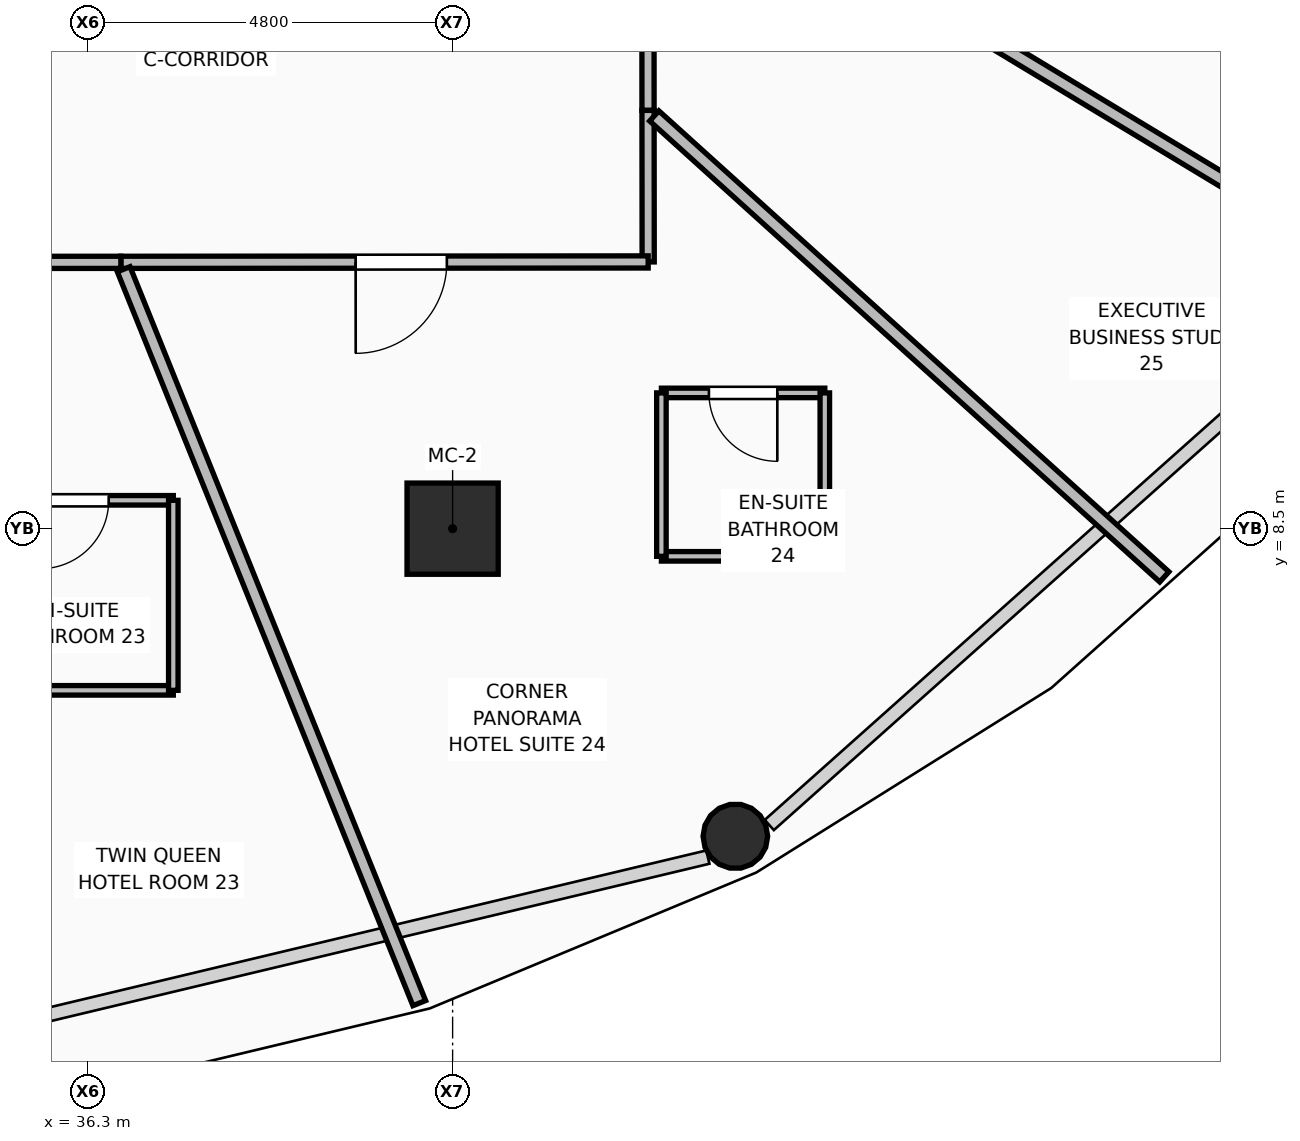
"""IFC4 building model, lengths in metres.
Left out: names, types, materials, properties, quantities, classifications, styles, units other than length and angle.
Written with IfcOpenShell. Run it as: python <this file> out.ifc"""

import sys

from ifc_helpers import new_model, si_unit, direction, frame, frame_2d, origin, origin_2d, place, context, subcontext, project, spatial, rectangle, hollow_rectangle, hollow_circle, extrude, element, fill, save


model = new_model("IFC4")
c1 = context("Model", 3, precision=1e-05, world=origin(), true_north=direction((0.0, 1.0)))
c2 = subcontext(c1, "Body", "Model", "MODEL_VIEW")
j1 = project(units=[si_unit("LENGTHUNIT", "METRE"), si_unit("PLANEANGLEUNIT", "RADIAN")], contexts=[c1])
p1 = place(None, origin())
s1 = spatial("IfcSite", under=j1, at=p1, CompositionType="ELEMENT")
p2 = place(p1, origin())
s2 = spatial("IfcBuilding", under=s1, at=p2, CompositionType="ELEMENT")
p3 = place(p2, frame((0.0, 0.0, 53.25)))
s3 = spatial("IfcBuildingStorey", under=s2, at=p3, CompositionType="ELEMENT", Elevation=53.25)
p4 = place(p3, frame((41.1, 8.5, 0.0), z_axis=(0.0, 0.0, 1.0), x_axis=(1.0, 0.0, 0.0)))
e1 = element("IfcColumn", 1, at=p4, inside=s3, PredefinedType="COLUMN", context=c2, shape_type="SweptSolid", body=[
    extrude(hollow_rectangle(XDim=1.2, YDim=1.2, WallThickness=0.045, at=origin_2d()), origin(), (0.0, 0.0, 1.0), 3.75),
])
p5 = place(p3, frame((44.82, 4.453, 0.0), z_axis=(0.111309599924, -0.172151708361, 0.978761442985), x_axis=(0.839754063035, 0.542966954443, 0.0)))
e2 = element("IfcColumn", 2, at=p5, inside=s3, PredefinedType="COLUMN", context=c2, shape_type="SweptSolid", body=[
    extrude(hollow_circle(Radius=0.425, WallThickness=0.04, at=origin_2d()), origin(), (0.0, 0.0, 1.0), 3.647),
])
p6 = place(p3, frame((43.669, 17.653, 0.0), z_axis=(0.0, 0.0, 1.0), x_axis=(0.000535081189, -0.999999856844, 0.0)))
e3 = element("IfcWall", 3, at=p6, inside=s3, PredefinedType="PARTITIONING", context=c2, shape_type="SweptSolid", body=[
    extrude(rectangle(XDim=3.65, YDim=0.16, at=frame_2d((1.825, 0.0))), origin(), (0.0, 0.0, 1.0), 2.928),
])
p7 = place(p6, frame((0.586, 0.0, 0.0)))
e4 = element("IfcOpeningElement", 4, at=p7, cuts=e3, PredefinedType="OPENING", context=c2, shape_type="SweptSolid", body=[
    extrude(rectangle(XDim=1.2, YDim=2.1, at=frame_2d((0.6, 1.05))), frame((0.0, 0.09, 0.0), z_axis=(0.0, -1.0, 0.0), x_axis=(1.0, 0.0, 0.0)), (0.0, 0.0, 1.0), 0.18),
])
p8 = place(p3, frame((43.671, 14.003, 0.0), z_axis=(0.0, 0.0, 1.0), x_axis=(0.001101995168, -0.999999392803, 0.0)))
e5 = element("IfcWall", 5, at=p8, inside=s3, PredefinedType="PARTITIONING", context=c2, shape_type="SweptSolid", body=[
    extrude(rectangle(XDim=1.994, YDim=0.16, at=frame_2d((0.997, 0.0))), origin(), (0.0, 0.0, 1.0), 3.55),
])
p9 = place(p3, frame((43.673, 12.009, 0.0), z_axis=(0.0, 0.0, 1.0), x_axis=(-0.999999726963, -0.000738968058, 0.0)))
e6 = element("IfcWall", 6, at=p9, inside=s3, PredefinedType="PARTITIONING", context=c2, shape_type="SweptSolid", body=[
    extrude(rectangle(XDim=6.938, YDim=0.16, at=frame_2d((3.469, 0.0))), origin(), (0.0, 0.0, 1.0), 2.928),
])
p10 = place(p9, frame((2.649, 0.0, 0.0)))
e7 = element("IfcOpeningElement", 7, at=p10, cuts=e6, PredefinedType="OPENING", context=c2, shape_type="SweptSolid", body=[
    extrude(rectangle(XDim=1.2, YDim=2.1, at=frame_2d((0.6, 1.05))), frame((0.0, 0.09, 0.0), z_axis=(0.0, -1.0, 0.0), x_axis=(1.0, 0.0, 0.0)), (0.0, 0.0, 1.0), 0.18),
])
p11 = place(p3, frame((36.735, 12.004, 0.0), z_axis=(0.0, 0.0, 1.0), x_axis=(-0.999999815255, -0.000607856434, 0.0)))
e8 = element("IfcWall", 8, at=p11, inside=s3, PredefinedType="PARTITIONING", context=c2, shape_type="SweptSolid", body=[
    extrude(rectangle(XDim=3.213, YDim=0.16, at=frame_2d((1.606, 0.0))), origin(), (0.0, 0.0, 1.0), 3.55),
])
p12 = place(p11, frame((1.034, 0.0, 0.0)))
e9 = element("IfcOpeningElement", 9, at=p12, cuts=e8, PredefinedType="OPENING", context=c2, shape_type="SweptSolid", body=[
    extrude(rectangle(XDim=1.0, YDim=2.1, at=frame_2d((0.5, 1.05))), frame((0.0, 0.09, 0.0), z_axis=(0.0, -1.0, 0.0), x_axis=(1.0, 0.0, 0.0)), (0.0, 0.0, 1.0), 0.18),
])
p13 = place(p3, frame((36.772, 11.913, 0.0), z_axis=(0.0, 0.0, 1.0), x_axis=(0.373617850664, -0.927582719581, 0.0)))
e10 = element("IfcWall", 10, at=p13, inside=s3, PredefinedType="PARTITIONING", context=c2, shape_type="SweptSolid", body=[
    extrude(rectangle(XDim=10.409, YDim=0.18, at=frame_2d((5.204, 0.0))), origin(), (0.0, 0.0, 1.0), 2.775),
])
p14 = place(p3, frame((43.753, 13.93, 0.0), z_axis=(0.0, 0.0, 1.0), x_axis=(0.741978761497, -0.670423386739, 0.0)))
e11 = element("IfcWall", 11, at=p14, inside=s3, PredefinedType="PARTITIONING", context=c2, shape_type="SweptSolid", body=[
    extrude(rectangle(XDim=9.045, YDim=0.18, at=frame_2d((4.522, 0.0))), origin(), (0.0, 0.0, 1.0), 2.775),
])
p15 = place(p3, frame((43.753, 17.603, 0.0), z_axis=(0.0, 0.0, 1.0), x_axis=(0.856050971563, -0.516891414212, 0.0)))
e12 = element("IfcWall", 12, at=p15, inside=s3, PredefinedType="PARTITIONING", context=c2, shape_type="SweptSolid", body=[
    extrude(rectangle(XDim=11.8, YDim=0.18, at=frame_2d((5.9, 0.0))), origin(), (0.0, 0.0, 1.0), 2.775),
])
p16 = place(p3, frame((34.825, 6.373, 0.0), z_axis=(0.0, 0.0, 1.0), x_axis=(1.0, 0.0, 0.0)))
e13 = element("IfcWall", 13, at=p16, inside=s3, PredefinedType="PARTITIONING", context=c2, shape_type="SweptSolid", body=[
    extrude(rectangle(XDim=2.6, YDim=0.125, at=frame_2d((1.3, 0.0))), origin(), (0.0, 0.0, 1.0), 3.55),
])
p17 = place(p3, frame((34.825, 8.873, 0.0), z_axis=(0.0, 0.0, 1.0), x_axis=(1.0, 0.0, 0.0)))
e14 = element("IfcWall", 14, at=p17, inside=s3, PredefinedType="PARTITIONING", context=c2, shape_type="SweptSolid", body=[
    extrude(rectangle(XDim=2.6, YDim=0.125, at=frame_2d((1.3, 0.0))), origin(), (0.0, 0.0, 1.0), 3.55),
])
p18 = place(p17, frame((0.85, 0.0, 0.0)))
e15 = element("IfcOpeningElement", 15, at=p18, cuts=e14, PredefinedType="OPENING", context=c2, shape_type="SweptSolid", body=[
    extrude(rectangle(XDim=0.9, YDim=2.1, at=frame_2d((0.45, 1.05))), frame((0.0, 0.073, 0.0), z_axis=(0.0, -1.0, 0.0), x_axis=(1.0, 0.0, 0.0)), (0.0, 0.0, 1.0), 0.145),
])
p19 = place(p3, frame((37.425, 6.373, 0.0), z_axis=(0.0, 0.0, 1.0), x_axis=(0.0, 1.0, 0.0)))
e16 = element("IfcWall", 16, at=p19, inside=s3, PredefinedType="PARTITIONING", context=c2, shape_type="SweptSolid", body=[
    extrude(rectangle(XDim=2.5, YDim=0.125, at=frame_2d((1.25, 0.0))), origin(), (0.0, 0.0, 1.0), 3.55),
])
p20 = place(p3, frame((43.847, 8.136, 0.0), z_axis=(0.0, 0.0, 1.0), x_axis=(1.0, 0.0, 0.0)))
e17 = element("IfcWall", 17, at=p20, inside=s3, PredefinedType="PARTITIONING", context=c2, shape_type="SweptSolid", body=[
    extrude(rectangle(XDim=2.15, YDim=0.125, at=frame_2d((1.075, 0.0))), origin(), (0.0, 0.0, 1.0), 2.928),
])
p21 = place(p3, frame((43.847, 10.286, 0.0), z_axis=(0.0, 0.0, 1.0), x_axis=(1.0, 0.0, 0.0)))
e18 = element("IfcWall", 18, at=p21, inside=s3, PredefinedType="PARTITIONING", context=c2, shape_type="SweptSolid", body=[
    extrude(rectangle(XDim=2.15, YDim=0.125, at=frame_2d((1.075, 0.0))), origin(), (0.0, 0.0, 1.0), 3.55),
])
p22 = place(p21, frame((0.625, 0.0, 0.0)))
e19 = element("IfcOpeningElement", 19, at=p22, cuts=e18, PredefinedType="OPENING", context=c2, shape_type="SweptSolid", body=[
    extrude(rectangle(XDim=0.9, YDim=2.1, at=frame_2d((0.45, 1.05))), frame((0.0, 0.073, 0.0), z_axis=(0.0, -1.0, 0.0), x_axis=(1.0, 0.0, 0.0)), (0.0, 0.0, 1.0), 0.145),
])
p23 = place(p3, frame((43.847, 8.136, 0.0), z_axis=(0.0, 0.0, 1.0), x_axis=(0.0, 1.0, 0.0)))
e20 = element("IfcWall", 20, at=p23, inside=s3, PredefinedType="PARTITIONING", context=c2, shape_type="SweptSolid", body=[
    extrude(rectangle(XDim=2.15, YDim=0.125, at=frame_2d((1.075, 0.0))), origin(), (0.0, 0.0, 1.0), 2.928),
])
p24 = place(p3, frame((45.997, 8.136, 0.0), z_axis=(0.0, 0.0, 1.0), x_axis=(0.0, 1.0, 0.0)))
e21 = element("IfcWall", 21, at=p24, inside=s3, PredefinedType="PARTITIONING", context=c2, shape_type="SweptSolid", body=[
    extrude(rectangle(XDim=2.15, YDim=0.125, at=frame_2d((1.075, 0.0))), origin(), (0.0, 0.0, 1.0), 3.55),
])
p25 = place(p18, frame((0.9, 0.0, 0.0), z_axis=(0.0, 0.0, 1.0), x_axis=(-1.0, 0.0, 0.0)))
e22 = element("IfcDoor", 22, at=p25, inside=s3, OperationType="SINGLE_SWING_RIGHT", PredefinedType="DOOR", context=c2, shape_type="SweptSolid", body=[
    extrude(rectangle(XDim=0.9, YDim=2.1, at=frame_2d((0.45, 1.05))), frame((0.0, 0.025, 0.0), z_axis=(0.0, -1.0, 0.0), x_axis=(1.0, 0.0, 0.0)), (0.0, 0.0, 1.0), 0.05),
])
fill(e15, e22)
p26 = place(p22, frame((0.9, 0.0, 0.0), z_axis=(0.0, 0.0, 1.0), x_axis=(-1.0, 0.0, 0.0)))
e23 = element("IfcDoor", 23, at=p26, inside=s3, OperationType="SINGLE_SWING_LEFT", PredefinedType="DOOR", context=c2, shape_type="SweptSolid", body=[
    extrude(rectangle(XDim=0.9, YDim=2.1, at=frame_2d((0.45, 1.05))), frame((0.0, 0.025, 0.0), z_axis=(0.0, -1.0, 0.0), x_axis=(1.0, 0.0, 0.0)), (0.0, 0.0, 1.0), 0.05),
])
fill(e19, e23)
p27 = place(p10, origin())
e24 = element("IfcDoor", 24, at=p27, inside=s3, OperationType="SINGLE_SWING_RIGHT", PredefinedType="DOOR", context=c2, shape_type="SweptSolid", body=[
    extrude(rectangle(XDim=1.2, YDim=2.1, at=frame_2d((0.6, 1.05))), frame((0.0, 0.025, 0.0), z_axis=(0.0, -1.0, 0.0), x_axis=(1.0, 0.0, 0.0)), (0.0, 0.0, 1.0), 0.05),
])
fill(e7, e24)
save(model, sys.argv[1])
